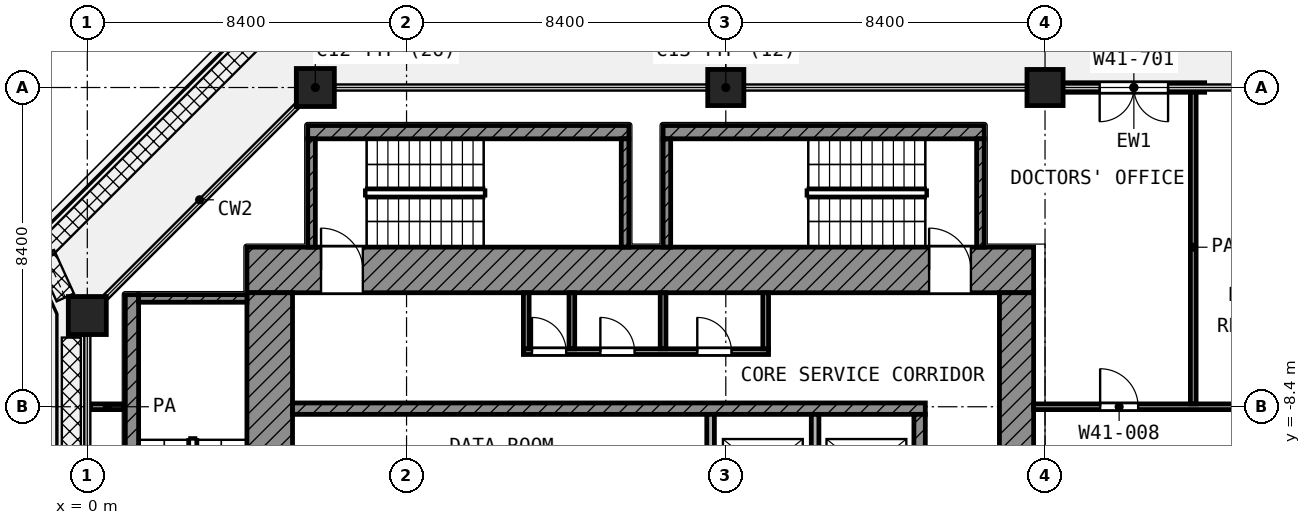
"""IFC4 building model, lengths in metres.
Left out: names, types, materials, properties, quantities, classifications, styles, units other than length and angle.
Written with IfcOpenShell. Run it as: python <this file> out.ifc"""

import sys

from ifc_helpers import new_model, si_unit, direction, frame, frame_2d, origin, origin_2d, place, context, subcontext, project, spatial, rectangle, extrude, element, fill, save


model = new_model("IFC4")
c1 = context("Model", 3, precision=1e-05, world=origin(), true_north=direction((0.0, 1.0)))
c2 = subcontext(c1, "Body", "Model", "MODEL_VIEW")
j1 = project(units=[si_unit("LENGTHUNIT", "METRE"), si_unit("PLANEANGLEUNIT", "RADIAN")], contexts=[c1])
p1 = place(None, origin())
s1 = spatial("IfcSite", under=j1, at=p1, CompositionType="ELEMENT")
p2 = place(p1, origin())
s2 = spatial("IfcBuilding", under=s1, at=p2, CompositionType="ELEMENT")
p3 = place(p2, frame((0.0, 0.0, 179.4)))
s3 = spatial("IfcBuildingStorey", under=s2, at=p3, CompositionType="ELEMENT", Elevation=179.4)
p4 = place(p3, frame((6.0, 0.0, 0.0), z_axis=(0.0, 0.0, 1.0), x_axis=(1.0, 0.0, 0.0)))
e1 = element("IfcColumn", 1, at=p4, inside=s3, PredefinedType="COLUMN", context=c2, shape_type="SweptSolid", body=[
    extrude(rectangle(XDim=1.0, YDim=1.0, at=origin_2d()), origin(), (0.0, 0.0, 1.0), 4.2),
])
for number, where, z_axis, x_axis in (
    (2, (16.8, 0.0, 0.0), (0.0, 0.0, 1.0), (1.0, 0.0, 0.0)),
    (3, (25.2, 0.0, 0.0), (0.0, 0.0, 1.0), (1.0, 0.0, 0.0)),
):
    element("IfcColumn", number, at=place(p3, frame(where, z_axis=z_axis, x_axis=x_axis)), inside=s3, PredefinedType="COLUMN", context=c2, shape_type="SweptSolid", body=[
        extrude(rectangle(XDim=0.95, YDim=0.95, at=origin_2d()), origin(), (0.0, 0.0, 1.0), 4.2),
    ])
p5 = place(p3, frame((0.0, -6.0, 0.0), z_axis=(0.0, 0.0, 1.0), x_axis=(1.0, 0.0, 0.0)))
e4 = element("IfcColumn", 4, at=p5, inside=s3, PredefinedType="COLUMN", context=c2, shape_type="SweptSolid", body=[
    extrude(rectangle(XDim=1.0, YDim=1.0, at=origin_2d()), origin(), (0.0, 0.0, 1.0), 4.2),
])
p6 = place(p3, frame((29.4, 0.0, 0.0), z_axis=(0.0, 0.0, 1.0), x_axis=(-1.0, 0.0, 0.0)))
e5 = element("IfcWall", 5, at=p6, inside=s3, PredefinedType="SOLIDWALL", context=c2, shape_type="SweptSolid", body=[
    extrude(rectangle(XDim=3.725, YDim=0.25, at=frame_2d((1.862, 0.0))), origin(), (0.0, 0.0, 1.0), 2.58),
])
p7 = place(p6, frame((0.962, 0.0, 0.0)))
e6 = element("IfcOpeningElement", 6, at=p7, cuts=e5, PredefinedType="OPENING", context=c2, shape_type="SweptSolid", body=[
    extrude(rectangle(XDim=1.8, YDim=2.1, at=frame_2d((0.9, 1.05))), frame((0.0, 0.135, 0.0), z_axis=(0.0, -1.0, 0.0), x_axis=(1.0, 0.0, 0.0)), (0.0, 0.0, 1.0), 0.27),
])
p8 = place(p3, frame((4.2, -4.8, 0.0), z_axis=(0.0, 0.0, 1.0), x_axis=(1.0, 0.0, 0.0)))
e7 = element("IfcWall", 7, at=p8, inside=s3, PredefinedType="SHEAR", context=c2, shape_type="SweptSolid", body=[
    extrude(rectangle(XDim=20.7, YDim=1.2, at=frame_2d((10.35, 0.0))), origin(), (0.0, 0.0, 1.0), 3.6),
])
p9 = place(p8, frame((1.95, 0.0, 0.0)))
e8 = element("IfcOpeningElement", 8, at=p9, cuts=e7, PredefinedType="OPENING", context=c2, shape_type="SweptSolid", body=[
    extrude(rectangle(XDim=1.1, YDim=2.1, at=frame_2d((0.55, 1.05))), frame((0.0, 0.61, 0.0), z_axis=(0.0, -1.0, 0.0), x_axis=(1.0, 0.0, 0.0)), (0.0, 0.0, 1.0), 1.22),
])
p10 = place(p8, frame((17.95, 0.0, 0.0)))
e9 = element("IfcOpeningElement", 9, at=p10, cuts=e7, PredefinedType="OPENING", context=c2, shape_type="SweptSolid", body=[
    extrude(rectangle(XDim=1.1, YDim=2.1, at=frame_2d((0.55, 1.05))), frame((0.0, 0.61, 0.0), z_axis=(0.0, -1.0, 0.0), x_axis=(1.0, 0.0, 0.0)), (0.0, 0.0, 1.0), 1.22),
])
p11 = place(p3, frame((4.8, -24.9, 0.0), z_axis=(0.0, 0.0, 1.0), x_axis=(0.0, 1.0, 0.0)))
e10 = element("IfcWall", 10, at=p11, inside=s3, PredefinedType="SHEAR", context=c2, shape_type="SweptSolid", body=[
    extrude(rectangle(XDim=19.5, YDim=1.2, at=frame_2d((9.75, 0.0))), origin(), (0.0, 0.0, 1.0), 3.6),
])
p12 = place(p11, frame((11.35, 0.0, 0.0)))
e11 = element("IfcOpeningElement", 11, at=p12, cuts=e10, PredefinedType="OPENING", context=c2, shape_type="SweptSolid", body=[
    extrude(rectangle(XDim=1.1, YDim=2.1, at=frame_2d((0.55, 1.05))), frame((0.0, 0.61, 0.0), z_axis=(0.0, -1.0, 0.0), x_axis=(1.0, 0.0, 0.0)), (0.0, 0.0, 1.0), 1.22),
])
p13 = place(p11, frame((2.05, 0.0, 0.0)))
e12 = element("IfcOpeningElement", 12, at=p13, cuts=e10, PredefinedType="OPENING", context=c2, shape_type="SweptSolid", body=[
    extrude(rectangle(XDim=1.1, YDim=2.1, at=frame_2d((0.55, 1.05))), frame((0.0, 0.61, 0.0), z_axis=(0.0, -1.0, 0.0), x_axis=(1.0, 0.0, 0.0)), (0.0, 0.0, 1.0), 1.22),
])
p14 = place(p3, frame((24.45, -24.0, 0.0), z_axis=(0.0, 0.0, 1.0), x_axis=(0.0, 1.0, 0.0)))
e13 = element("IfcWall", 13, at=p14, inside=s3, PredefinedType="SHEAR", context=c2, shape_type="SweptSolid", body=[
    extrude(rectangle(XDim=18.6, YDim=0.9, at=frame_2d((9.3, 0.0))), origin(), (0.0, 0.0, 1.0), 3.6),
])
p15 = place(p14, frame((10.5, 0.0, 0.0)))
e14 = element("IfcOpeningElement", 14, at=p15, cuts=e13, PredefinedType="OPENING", context=c2, shape_type="SweptSolid", body=[
    extrude(rectangle(XDim=1.8, YDim=2.1, at=frame_2d((0.9, 1.05))), frame((0.0, 0.46, 0.0), z_axis=(0.0, -1.0, 0.0), x_axis=(1.0, 0.0, 0.0)), (0.0, 0.0, 1.0), 0.92),
])
p16 = place(p3, frame((5.4, -8.45, 0.0), z_axis=(0.0, 0.0, 1.0), x_axis=(1.0, 0.0, 0.0)))
e15 = element("IfcWall", 15, at=p16, inside=s3, PredefinedType="SHEAR", context=c2, shape_type="SweptSolid", body=[
    extrude(rectangle(XDim=16.65, YDim=0.3, at=frame_2d((8.325, 0.0))), origin(), (0.0, 0.0, 1.0), 3.6),
])
p17 = place(p3, frame((21.9, -10.95, 0.0), z_axis=(0.0, 0.0, 1.0), x_axis=(0.0, 1.0, 0.0)))
e16 = element("IfcWall", 16, at=p17, inside=s3, PredefinedType="SHEAR", context=c2, shape_type="SweptSolid", body=[
    extrude(rectangle(XDim=2.35, YDim=0.3, at=frame_2d((1.175, 0.0))), origin(), (0.0, 0.0, 1.0), 3.6),
])
for number, where, z_axis, x_axis in (
    (17, (16.4, -10.95, 0.0), (0.0, 0.0, 1.0), (0.0, 1.0, 0.0)),
    (18, (19.15, -10.95, 0.0), (0.0, 0.0, 1.0), (0.0, 1.0, 0.0)),
):
    element("IfcWall", number, at=place(p3, frame(where, z_axis=z_axis, x_axis=x_axis)), inside=s3, PredefinedType="PARTITIONING", context=c2, shape_type="SweptSolid", body=[
        extrude(rectangle(XDim=2.35, YDim=0.2, at=frame_2d((1.175, 0.0))), origin(), (0.0, 0.0, 1.0), 3.6),
    ])
p18 = place(p3, frame((11.475, -6.95, 0.0), z_axis=(0.0, 0.0, 1.0), x_axis=(1.0, 0.0, 0.0)))
e19 = element("IfcWall", 19, at=p18, inside=s3, PredefinedType="PARTITIONING", context=c2, shape_type="SweptSolid", body=[
    extrude(rectangle(XDim=6.45, YDim=0.15, at=frame_2d((3.225, 0.0))), origin(), (0.0, 0.0, 1.0), 3.6),
])
p19 = place(p18, frame((0.225, 0.0, 0.0)))
e20 = element("IfcOpeningElement", 20, at=p19, cuts=e19, PredefinedType="OPENING", context=c2, shape_type="SweptSolid", body=[
    extrude(rectangle(XDim=0.9, YDim=2.1, at=frame_2d((0.45, 1.05))), frame((0.0, 0.085, 0.0), z_axis=(0.0, -1.0, 0.0), x_axis=(1.0, 0.0, 0.0)), (0.0, 0.0, 1.0), 0.17),
])
p20 = place(p18, frame((2.025, 0.0, 0.0)))
e21 = element("IfcOpeningElement", 21, at=p20, cuts=e19, PredefinedType="OPENING", context=c2, shape_type="SweptSolid", body=[
    extrude(rectangle(XDim=0.9, YDim=2.1, at=frame_2d((0.45, 1.05))), frame((0.0, 0.085, 0.0), z_axis=(0.0, -1.0, 0.0), x_axis=(1.0, 0.0, 0.0)), (0.0, 0.0, 1.0), 0.17),
])
p21 = place(p18, frame((4.575, 0.0, 0.0)))
e22 = element("IfcOpeningElement", 22, at=p21, cuts=e19, PredefinedType="OPENING", context=c2, shape_type="SweptSolid", body=[
    extrude(rectangle(XDim=0.9, YDim=2.1, at=frame_2d((0.45, 1.05))), frame((0.0, 0.085, 0.0), z_axis=(0.0, -1.0, 0.0), x_axis=(1.0, 0.0, 0.0)), (0.0, 0.0, 1.0), 0.17),
])
for number, where, z_axis, x_axis in (
    (23, (11.55, -6.875, 0.0), (0.0, 0.0, 1.0), (0.0, 1.0, 0.0)),
    (24, (12.75, -6.875, 0.0), (0.0, 0.0, 1.0), (0.0, 1.0, 0.0)),
    (25, (15.15, -6.875, 0.0), (0.0, 0.0, 1.0), (0.0, 1.0, 0.0)),
    (26, (17.85, -6.875, 0.0), (0.0, 0.0, 1.0), (0.0, 1.0, 0.0)),
):
    element("IfcWall", number, at=place(p3, frame(where, z_axis=z_axis, x_axis=x_axis)), inside=s3, PredefinedType="PARTITIONING", context=c2, shape_type="SweptSolid", body=[
        extrude(rectangle(XDim=1.475, YDim=0.15, at=frame_2d((0.738, 0.0))), origin(), (0.0, 0.0, 1.0), 3.6),
    ])
p22 = place(p3, frame((1.175, -13.9, 0.0), z_axis=(0.0, 0.0, 1.0), x_axis=(0.0, 1.0, 0.0)))
e27 = element("IfcWall", 27, at=p22, inside=s3, PredefinedType="SHEAR", context=c2, shape_type="SweptSolid", body=[
    extrude(rectangle(XDim=8.45, YDim=0.35, at=frame_2d((4.225, 0.0))), origin(), (0.0, 0.0, 1.0), 3.6),
])
p23 = place(p3, frame((1.35, -5.55, 0.0), z_axis=(0.0, 0.0, 1.0), x_axis=(1.0, 0.0, 0.0)))
e28 = element("IfcWall", 28, at=p23, inside=s3, PredefinedType="SHEAR", context=c2, shape_type="SweptSolid", body=[
    extrude(rectangle(XDim=2.85, YDim=0.2, at=frame_2d((1.425, 0.0))), origin(), (0.0, 0.0, 1.0), 3.6),
])
p24 = place(p3, frame((5.8, -1.175, 0.0), z_axis=(0.0, 0.0, 1.0), x_axis=(1.0, 0.0, 0.0)))
e29 = element("IfcWall", 29, at=p24, inside=s3, PredefinedType="SHEAR", context=c2, shape_type="SweptSolid", body=[
    extrude(rectangle(XDim=8.45, YDim=0.35, at=frame_2d((4.225, 0.0))), origin(), (0.0, 0.0, 1.0), 3.6),
])
for number, where, z_axis, x_axis in (
    (30, (5.9, -4.2, 0.0), (0.0, 0.0, 1.0), (0.0, 1.0, 0.0)),
    (31, (14.15, -4.2, 0.0), (0.0, 0.0, 1.0), (0.0, 1.0, 0.0)),
):
    element("IfcWall", number, at=place(p3, frame(where, z_axis=z_axis, x_axis=x_axis)), inside=s3, PredefinedType="SHEAR", context=c2, shape_type="SweptSolid", body=[
        extrude(rectangle(XDim=2.85, YDim=0.2, at=frame_2d((1.425, 0.0))), origin(), (0.0, 0.0, 1.0), 3.6),
    ])
p25 = place(p3, frame((15.15, -1.175, 0.0), z_axis=(0.0, 0.0, 1.0), x_axis=(1.0, 0.0, 0.0)))
e32 = element("IfcWall", 32, at=p25, inside=s3, PredefinedType="SHEAR", context=c2, shape_type="SweptSolid", body=[
    extrude(rectangle(XDim=8.45, YDim=0.35, at=frame_2d((4.225, 0.0))), origin(), (0.0, 0.0, 1.0), 3.6),
])
for number, where, z_axis, x_axis in (
    (33, (15.25, -4.2, 0.0), (0.0, 0.0, 1.0), (0.0, 1.0, 0.0)),
    (34, (23.5, -4.2, 0.0), (0.0, 0.0, 1.0), (0.0, 1.0, 0.0)),
):
    element("IfcWall", number, at=place(p3, frame(where, z_axis=z_axis, x_axis=x_axis)), inside=s3, PredefinedType="SHEAR", context=c2, shape_type="SweptSolid", body=[
        extrude(rectangle(XDim=2.85, YDim=0.2, at=frame_2d((1.425, 0.0))), origin(), (0.0, 0.0, 1.0), 3.6),
    ])
p26 = place(p3, frame((0.08, -8.4, 0.0), z_axis=(0.0, 0.0, 1.0), x_axis=(1.0, 0.0, 0.0)))
e35 = element("IfcWall", 35, at=p26, inside=s3, PredefinedType="PARTITIONING", context=c2, shape_type="SweptSolid", body=[
    extrude(rectangle(XDim=0.89, YDim=0.15, at=frame_2d((0.445, 0.0))), origin(), (0.0, 0.0, 1.0), 3.6),
])
p27 = place(p3, frame((24.9, -8.4, 0.0), z_axis=(0.0, 0.0, 1.0), x_axis=(1.0, 0.0, 0.0)))
e36 = element("IfcWall", 36, at=p27, inside=s3, PredefinedType="PARTITIONING", context=c2, shape_type="SweptSolid", body=[
    extrude(rectangle(XDim=15.282, YDim=0.15, at=frame_2d((7.641, 0.0))), origin(), (0.0, 0.0, 1.0), 3.6),
])
p28 = place(p27, frame((1.75, 0.0, 0.0)))
e37 = element("IfcOpeningElement", 37, at=p28, cuts=e36, PredefinedType="OPENING", context=c2, shape_type="SweptSolid", body=[
    extrude(rectangle(XDim=1.0, YDim=2.1, at=frame_2d((0.5, 1.05))), frame((0.0, 0.085, 0.0), z_axis=(0.0, -1.0, 0.0), x_axis=(1.0, 0.0, 0.0)), (0.0, 0.0, 1.0), 0.17),
])
p29 = place(p27, frame((5.85, 0.0, 0.0)))
e38 = element("IfcOpeningElement", 38, at=p29, cuts=e36, PredefinedType="OPENING", context=c2, shape_type="SweptSolid", body=[
    extrude(rectangle(XDim=1.2, YDim=2.1, at=frame_2d((0.6, 1.05))), frame((0.0, 0.085, 0.0), z_axis=(0.0, -1.0, 0.0), x_axis=(1.0, 0.0, 0.0)), (0.0, 0.0, 1.0), 0.17),
])
p30 = place(p27, frame((9.3, 0.0, 0.0)))
e39 = element("IfcOpeningElement", 39, at=p30, cuts=e36, PredefinedType="OPENING", context=c2, shape_type="SweptSolid", body=[
    extrude(rectangle(XDim=1.2, YDim=2.1, at=frame_2d((0.6, 1.05))), frame((0.0, 0.085, 0.0), z_axis=(0.0, -1.0, 0.0), x_axis=(1.0, 0.0, 0.0)), (0.0, 0.0, 1.0), 0.17),
])
p31 = place(p3, frame((29.1, -8.325, 0.0), z_axis=(0.0, 0.0, 1.0), x_axis=(0.0, 1.0, 0.0)))
e40 = element("IfcWall", 40, at=p31, inside=s3, PredefinedType="PARTITIONING", context=c2, shape_type="SweptSolid", body=[
    extrude(rectangle(XDim=8.245, YDim=0.15, at=frame_2d((4.123, 0.0))), origin(), (0.0, 0.0, 1.0), 2.7),
])
p32 = place(p7, origin())
e41 = element("IfcDoor", 41, at=p32, inside=s3, OperationType="DOUBLE_DOOR_SINGLE_SWING", PredefinedType="DOOR", context=c2, shape_type="SweptSolid", body=[
    extrude(rectangle(XDim=1.8, YDim=2.1, at=frame_2d((0.9, 1.05))), frame((0.0, 0.025, 0.0), z_axis=(0.0, -1.0, 0.0), x_axis=(1.0, 0.0, 0.0)), (0.0, 0.0, 1.0), 0.05),
])
fill(e6, e41)
p33 = place(p9, origin())
e42 = element("IfcDoor", 42, at=p33, inside=s3, OperationType="SINGLE_SWING_LEFT", PredefinedType="DOOR", context=c2, shape_type="SweptSolid", body=[
    extrude(rectangle(XDim=1.1, YDim=2.1, at=frame_2d((0.55, 1.05))), frame((0.0, 0.025, 0.0), z_axis=(0.0, -1.0, 0.0), x_axis=(1.0, 0.0, 0.0)), (0.0, 0.0, 1.0), 0.05),
])
fill(e8, e42)
p34 = place(p10, origin())
e43 = element("IfcDoor", 43, at=p34, inside=s3, OperationType="SINGLE_SWING_LEFT", PredefinedType="DOOR", context=c2, shape_type="SweptSolid", body=[
    extrude(rectangle(XDim=1.1, YDim=2.1, at=frame_2d((0.55, 1.05))), frame((0.0, 0.025, 0.0), z_axis=(0.0, -1.0, 0.0), x_axis=(1.0, 0.0, 0.0)), (0.0, 0.0, 1.0), 0.05),
])
fill(e9, e43)
p35 = place(p19, origin())
e44 = element("IfcDoor", 44, at=p35, inside=s3, OperationType="SINGLE_SWING_LEFT", PredefinedType="DOOR", context=c2, shape_type="SweptSolid", body=[
    extrude(rectangle(XDim=0.9, YDim=2.1, at=frame_2d((0.45, 1.05))), frame((0.0, 0.025, 0.0), z_axis=(0.0, -1.0, 0.0), x_axis=(1.0, 0.0, 0.0)), (0.0, 0.0, 1.0), 0.05),
])
fill(e20, e44)
p36 = place(p20, origin())
e45 = element("IfcDoor", 45, at=p36, inside=s3, OperationType="SINGLE_SWING_LEFT", PredefinedType="DOOR", context=c2, shape_type="SweptSolid", body=[
    extrude(rectangle(XDim=0.9, YDim=2.1, at=frame_2d((0.45, 1.05))), frame((0.0, 0.025, 0.0), z_axis=(0.0, -1.0, 0.0), x_axis=(1.0, 0.0, 0.0)), (0.0, 0.0, 1.0), 0.05),
])
fill(e21, e45)
p37 = place(p21, origin())
e46 = element("IfcDoor", 46, at=p37, inside=s3, OperationType="SINGLE_SWING_LEFT", PredefinedType="DOOR", context=c2, shape_type="SweptSolid", body=[
    extrude(rectangle(XDim=0.9, YDim=2.1, at=frame_2d((0.45, 1.05))), frame((0.0, 0.025, 0.0), z_axis=(0.0, -1.0, 0.0), x_axis=(1.0, 0.0, 0.0)), (0.0, 0.0, 1.0), 0.05),
])
fill(e22, e46)
p38 = place(p28, origin())
e47 = element("IfcDoor", 47, at=p38, inside=s3, OperationType="SINGLE_SWING_LEFT", PredefinedType="DOOR", context=c2, shape_type="SweptSolid", body=[
    extrude(rectangle(XDim=1.0, YDim=2.1, at=frame_2d((0.5, 1.05))), frame((0.0, 0.025, 0.0), z_axis=(0.0, -1.0, 0.0), x_axis=(1.0, 0.0, 0.0)), (0.0, 0.0, 1.0), 0.05),
])
fill(e37, e47)
save(model, sys.argv[1])
